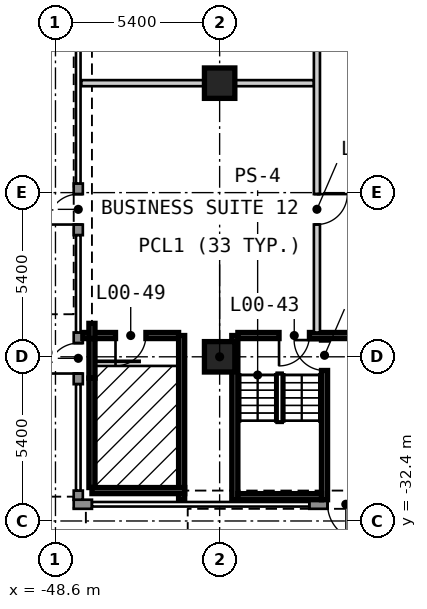
"""IFC4 building model, lengths in metres.
Left out: names, types, materials, properties, quantities, classifications, styles, units other than length and angle.
Written with IfcOpenShell. Run it as: python <this file> out.ifc"""

import sys

from ifc_helpers import new_model, si_unit, direction, frame, frame_2d, origin, origin_2d, place, context, subcontext, project, spatial, rectangle, extrude, element, fill, save


model = new_model("IFC4")
c1 = context("Model", 3, precision=1e-05, world=origin(), true_north=direction((0.0, 1.0)))
c2 = subcontext(c1, "Body", "Model", "MODEL_VIEW")
j1 = project(units=[si_unit("LENGTHUNIT", "METRE"), si_unit("PLANEANGLEUNIT", "RADIAN")], contexts=[c1])
p1 = place(None, origin())
s1 = spatial("IfcSite", under=j1, at=p1, CompositionType="ELEMENT")
p2 = place(p1, origin())
s2 = spatial("IfcBuilding", under=s1, at=p2, CompositionType="ELEMENT")
p3 = place(p2, origin())
s3 = spatial("IfcBuildingStorey", under=s2, at=p3, CompositionType="ELEMENT", Elevation=0.0)
for number, where, z_axis, x_axis in (
    (1, (-43.2, -27.0, 0.0), (0.0, 0.0, 1.0), (1.0, 0.0, 0.0)),
    (2, (-43.2, -18.0, 0.0), (0.0, 0.0, 1.0), (1.0, 0.0, 0.0)),
):
    element("IfcColumn", number, at=place(p3, frame(where, z_axis=z_axis, x_axis=x_axis)), inside=s3, PredefinedType="COLUMN", context=c2, shape_type="SweptSolid", body=[
        extrude(rectangle(XDim=1.0, YDim=1.0, at=origin_2d()), origin(), (0.0, 0.0, 1.0), 5.0),
    ])
p4 = place(p3, frame((-48.0, -31.85, 0.0), z_axis=(0.0, 0.0, 1.0), x_axis=(1.0, 0.0, 0.0)))
e3 = element("IfcWall", 3, at=p4, inside=s3, PredefinedType="SOLIDWALL", context=c2, shape_type="SweptSolid", body=[
    extrude(rectangle(XDim=0.6, YDim=0.3, at=frame_2d((0.3, 0.0))), origin(), (0.0, 0.0, 1.0), 4.55),
])
p5 = place(p3, frame((-40.25, -31.85, 0.0), z_axis=(0.0, 0.0, 1.0), x_axis=(1.0, 0.0, 0.0)))
e4 = element("IfcWall", 4, at=p5, inside=s3, PredefinedType="SOLIDWALL", context=c2, shape_type="SweptSolid", body=[
    extrude(rectangle(XDim=2.4, YDim=0.3, at=frame_2d((1.2, 0.0))), origin(), (0.0, 0.0, 1.0), 4.55),
])
p6 = place(p5, frame((1.8, 0.0, 0.0), z_axis=(0.0, 0.0, 1.0), x_axis=(-1.0, 0.0, 0.0)))
e5 = element("IfcOpeningElement", 5, at=p6, cuts=e4, PredefinedType="OPENING", context=c2, shape_type="SweptSolid", body=[
    extrude(rectangle(XDim=1.2, YDim=2.4, at=frame_2d((0.6, 1.2))), frame((0.0, 0.16, 0.0), z_axis=(0.0, -1.0, 0.0), x_axis=(1.0, 0.0, 0.0)), (0.0, 0.0, 1.0), 0.32),
])
p7 = place(p3, frame((-47.85, -21.3, 0.0), z_axis=(0.0, 0.0, 1.0), x_axis=(0.0, -1.0, 0.0)))
e6 = element("IfcWall", 6, at=p7, inside=s3, PredefinedType="SOLIDWALL", context=c2, shape_type="SweptSolid", body=[
    extrude(rectangle(XDim=1.7, YDim=0.3, at=frame_2d((0.85, 0.0))), origin(), (0.0, 0.0, 1.0), 4.55),
])
p8 = place(p7, frame((1.35, 0.0, 0.0), z_axis=(0.0, 0.0, 1.0), x_axis=(-1.0, 0.0, 0.0)))
e7 = element("IfcOpeningElement", 7, at=p8, cuts=e6, PredefinedType="OPENING", context=c2, shape_type="SweptSolid", body=[
    extrude(rectangle(XDim=1.0, YDim=2.4, at=frame_2d((0.5, 1.2))), frame((0.0, 0.16, 0.0), z_axis=(0.0, -1.0, 0.0), x_axis=(1.0, 0.0, 0.0)), (0.0, 0.0, 1.0), 0.32),
])
p9 = place(p3, frame((-47.85, -26.2, 0.0), z_axis=(0.0, 0.0, 1.0), x_axis=(0.0, -1.0, 0.0)))
e8 = element("IfcWall", 8, at=p9, inside=s3, PredefinedType="SOLIDWALL", context=c2, shape_type="SweptSolid", body=[
    extrude(rectangle(XDim=1.7, YDim=0.3, at=frame_2d((0.85, 0.0))), origin(), (0.0, 0.0, 1.0), 4.55),
])
p10 = place(p9, frame((1.35, 0.0, 0.0), z_axis=(0.0, 0.0, 1.0), x_axis=(-1.0, 0.0, 0.0)))
e9 = element("IfcOpeningElement", 9, at=p10, cuts=e8, PredefinedType="OPENING", context=c2, shape_type="SweptSolid", body=[
    extrude(rectangle(XDim=1.0, YDim=2.4, at=frame_2d((0.5, 1.2))), frame((0.0, 0.16, 0.0), z_axis=(0.0, -1.0, 0.0), x_axis=(1.0, 0.0, 0.0)), (0.0, 0.0, 1.0), 0.32),
])
p11 = place(p3, frame((-47.85, -31.4, 0.0), z_axis=(0.0, 0.0, 1.0), x_axis=(0.0, -1.0, 0.0)))
e10 = element("IfcWall", 10, at=p11, inside=s3, PredefinedType="SOLIDWALL", context=c2, shape_type="SweptSolid", body=[
    extrude(rectangle(XDim=0.3, YDim=0.3, at=frame_2d((0.15, 0.0))), origin(), (0.0, 0.0, 1.0), 4.55),
])
p12 = place(p3, frame((-47.7, -26.3, 0.0), z_axis=(0.0, 0.0, 1.0), x_axis=(1.0, 0.0, 0.0)))
e11 = element("IfcWall", 11, at=p12, inside=s3, PredefinedType="SOLIDWALL", context=c2, shape_type="SweptSolid", body=[
    extrude(rectangle(XDim=3.15, YDim=0.2, at=frame_2d((1.575, 0.0))), origin(), (0.0, 0.0, 1.0), 4.55),
])
p13 = place(p12, frame((2.075, 0.0, 0.0), z_axis=(0.0, 0.0, 1.0), x_axis=(-1.0, 0.0, 0.0)))
e12 = element("IfcOpeningElement", 12, at=p13, cuts=e11, PredefinedType="OPENING", context=c2, shape_type="SweptSolid", body=[
    extrude(rectangle(XDim=1.0, YDim=2.1, at=frame_2d((0.5, 1.05))), frame((0.0, 0.11, 0.0), z_axis=(0.0, -1.0, 0.0), x_axis=(1.0, 0.0, 0.0)), (0.0, 0.0, 1.0), 0.22),
])
p14 = place(p3, frame((-42.6, -26.3, 0.0), z_axis=(0.0, 0.0, 1.0), x_axis=(1.0, 0.0, 0.0)))
e13 = element("IfcWall", 13, at=p14, inside=s3, PredefinedType="SOLIDWALL", context=c2, shape_type="SweptSolid", body=[
    extrude(rectangle(XDim=15.15, YDim=0.2, at=frame_2d((7.575, 0.0))), origin(), (0.0, 0.0, 1.0), 4.55),
])
p15 = place(p14, frame((8.025, 0.0, 0.0), z_axis=(0.0, 0.0, 1.0), x_axis=(-1.0, 0.0, 0.0)))
e14 = element("IfcOpeningElement", 14, at=p15, cuts=e13, PredefinedType="OPENING", context=c2, shape_type="SweptSolid", body=[
    extrude(rectangle(XDim=1.0, YDim=2.1, at=frame_2d((0.5, 1.05))), frame((0.0, 0.11, 0.0), z_axis=(0.0, -1.0, 0.0), x_axis=(1.0, 0.0, 0.0)), (0.0, 0.0, 1.0), 0.22),
])
p16 = place(p14, frame((2.354, 0.0, 0.0), z_axis=(0.0, 0.0, 1.0), x_axis=(-1.0, 0.0, 0.0)))
e15 = element("IfcOpeningElement", 15, at=p16, cuts=e13, PredefinedType="OPENING", context=c2, shape_type="SweptSolid", body=[
    extrude(rectangle(XDim=1.0, YDim=2.1, at=frame_2d((0.5, 1.05))), frame((0.0, 0.11, 0.0), z_axis=(0.0, -1.0, 0.0), x_axis=(1.0, 0.0, 0.0)), (0.0, 0.0, 1.0), 0.22),
])
p17 = place(p14, frame((12.575, 0.0, 0.0), z_axis=(0.0, 0.0, 1.0), x_axis=(-1.0, 0.0, 0.0)))
e16 = element("IfcOpeningElement", 16, at=p17, cuts=e13, PredefinedType="OPENING", context=c2, shape_type="SweptSolid", body=[
    extrude(rectangle(XDim=1.0, YDim=2.1, at=frame_2d((0.5, 1.05))), frame((0.0, 0.11, 0.0), z_axis=(0.0, -1.0, 0.0), x_axis=(1.0, 0.0, 0.0)), (0.0, 0.0, 1.0), 0.22),
])
p18 = place(p3, frame((-47.75, -18.0, 0.0), z_axis=(0.0, 0.0, 1.0), x_axis=(1.0, 0.0, 0.0)))
e17 = element("IfcWall", 17, at=p18, inside=s3, PredefinedType="PARTITIONING", context=c2, shape_type="SweptSolid", body=[
    extrude(rectangle(XDim=7.65, YDim=0.2, at=frame_2d((3.825, 0.0))), origin(), (0.0, 0.0, 1.0), 4.55),
])
for number, where, z_axis, x_axis in (
    (18, (-44.45, -31.7, 0.0), (0.0, 0.0, 1.0), (0.0, 1.0, 0.0)),
    (19, (-42.7, -31.7, 0.0), (0.0, 0.0, 1.0), (0.0, 1.0, 0.0)),
):
    element("IfcWall", number, at=place(p3, frame(where, z_axis=z_axis, x_axis=x_axis)), inside=s3, PredefinedType="SOLIDWALL", context=c2, shape_type="SweptSolid", body=[
        extrude(rectangle(XDim=5.4, YDim=0.2, at=frame_2d((2.7, 0.0))), origin(), (0.0, 0.0, 1.0), 4.55),
    ])
p19 = place(p3, frame((-40.0, -26.2, 0.0), z_axis=(0.0, 0.0, 1.0), x_axis=(0.0, 1.0, 0.0)))
e20 = element("IfcWall", 20, at=p19, inside=s3, PredefinedType="PARTITIONING", context=c2, shape_type="SweptSolid", body=[
    extrude(rectangle(XDim=17.08, YDim=0.2, at=frame_2d((8.54, 0.0))), origin(), (0.0, 0.0, 1.0), 4.55),
])
p20 = place(p19, frame((3.552, 0.0, 0.0)))
e21 = element("IfcOpeningElement", 21, at=p20, cuts=e20, PredefinedType="OPENING", context=c2, shape_type="SweptSolid", body=[
    extrude(rectangle(XDim=1.0, YDim=2.1, at=frame_2d((0.5, 1.05))), frame((0.0, 0.11, 0.0), z_axis=(0.0, -1.0, 0.0), x_axis=(1.0, 0.0, 0.0)), (0.0, 0.0, 1.0), 0.22),
])
p21 = place(p19, frame((12.198, 0.0, 0.0)))
e22 = element("IfcOpeningElement", 22, at=p21, cuts=e20, PredefinedType="OPENING", context=c2, shape_type="SweptSolid", body=[
    extrude(rectangle(XDim=1.0, YDim=2.1, at=frame_2d((0.5, 1.05))), frame((0.0, 0.11, 0.0), z_axis=(0.0, -1.0, 0.0), x_axis=(1.0, 0.0, 0.0)), (0.0, 0.0, 1.0), 0.22),
])
p22 = place(p3, frame((-39.75, -31.7, 0.0), z_axis=(0.0, 0.0, 1.0), x_axis=(0.0, 1.0, 0.0)))
e23 = element("IfcWall", 23, at=p22, inside=s3, PredefinedType="SOLIDWALL", context=c2, shape_type="SweptSolid", body=[
    extrude(rectangle(XDim=5.3, YDim=0.2, at=frame_2d((2.65, 0.0))), origin(), (0.0, 0.0, 1.0), 4.55),
])
p23 = place(p22, frame((5.25, 0.0, 0.0), z_axis=(0.0, 0.0, 1.0), x_axis=(-1.0, 0.0, 0.0)))
e24 = element("IfcOpeningElement", 24, at=p23, cuts=e23, PredefinedType="OPENING", context=c2, shape_type="SweptSolid", body=[
    extrude(rectangle(XDim=1.0, YDim=2.1, at=frame_2d((0.5, 1.05))), frame((0.0, 0.11, 0.0), z_axis=(0.0, -1.0, 0.0), x_axis=(1.0, 0.0, 0.0)), (0.0, 0.0, 1.0), 0.22),
])
p24 = place(p3, frame((-47.4, -31.3, 0.0), z_axis=(0.0, 0.0, 1.0), x_axis=(0.0, 1.0, 0.0)))
e25 = element("IfcWall", 25, at=p24, inside=s3, PredefinedType="SOLIDWALL", context=c2, shape_type="SweptSolid", body=[
    extrude(rectangle(XDim=3.6, YDim=0.2, at=frame_2d((1.8, 0.0))), origin(), (0.0, 0.0, 1.0), 4.55),
])
p25 = place(p3, frame((-47.4, -26.4, 0.0), z_axis=(0.0, 0.0, 1.0), x_axis=(0.0, 1.0, 0.0)))
e26 = element("IfcWall", 26, at=p25, inside=s3, PredefinedType="SOLIDWALL", context=c2, shape_type="SweptSolid", body=[
    extrude(rectangle(XDim=0.5, YDim=0.2, at=frame_2d((0.25, 0.0))), origin(), (0.0, 0.0, 1.0), 4.55),
])
p26 = place(p3, frame((-47.4, -27.7, 2.3), z_axis=(0.0, 0.0, 1.0), x_axis=(0.0, 1.0, 0.0)))
e27 = element("IfcWall", 27, at=p26, inside=s3, PredefinedType="SOLIDWALL", context=c2, shape_type="SweptSolid", body=[
    extrude(rectangle(XDim=1.3, YDim=0.2, at=frame_2d((0.65, 0.0))), origin(), (0.0, 0.0, 1.0), 2.25),
])
p27 = place(p3, frame((-47.4, -31.4, 0.0), z_axis=(0.0, 0.0, 1.0), x_axis=(1.0, 0.0, 0.0)))
e28 = element("IfcWall", 28, at=p27, inside=s3, PredefinedType="SOLIDWALL", context=c2, shape_type="SweptSolid", body=[
    extrude(rectangle(XDim=3.05, YDim=0.2, at=frame_2d((1.525, 0.0))), origin(), (0.0, 0.0, 1.0), 4.55),
])
p28 = place(p3, frame((-42.6, -31.6, 0.0), z_axis=(0.0, 0.0, 1.0), x_axis=(1.0, 0.0, 0.0)))
e29 = element("IfcWall", 29, at=p28, inside=s3, PredefinedType="SOLIDWALL", context=c2, shape_type="SweptSolid", body=[
    extrude(rectangle(XDim=2.75, YDim=0.2, at=frame_2d((1.375, 0.0))), origin(), (0.0, 0.0, 1.0), 4.55),
])
p29 = place(p6, origin())
e30 = element("IfcDoor", 30, at=p29, inside=s3, OperationType="SINGLE_SWING_RIGHT", PredefinedType="DOOR", context=c2, shape_type="SweptSolid", body=[
    extrude(rectangle(XDim=1.2, YDim=2.4, at=frame_2d((0.6, 1.2))), frame((0.0, 0.025, 0.0), z_axis=(0.0, -1.0, 0.0), x_axis=(1.0, 0.0, 0.0)), (0.0, 0.0, 1.0), 0.05),
])
fill(e5, e30)
p30 = place(p8, origin())
e31 = element("IfcDoor", 31, at=p30, inside=s3, OperationType="SINGLE_SWING_RIGHT", PredefinedType="DOOR", context=c2, shape_type="SweptSolid", body=[
    extrude(rectangle(XDim=1.0, YDim=2.4, at=frame_2d((0.5, 1.2))), frame((0.0, 0.025, 0.0), z_axis=(0.0, -1.0, 0.0), x_axis=(1.0, 0.0, 0.0)), (0.0, 0.0, 1.0), 0.05),
])
fill(e7, e31)
p31 = place(p10, origin())
e32 = element("IfcDoor", 32, at=p31, inside=s3, OperationType="SINGLE_SWING_RIGHT", PredefinedType="DOOR", context=c2, shape_type="SweptSolid", body=[
    extrude(rectangle(XDim=1.0, YDim=2.4, at=frame_2d((0.5, 1.2))), frame((0.0, 0.025, 0.0), z_axis=(0.0, -1.0, 0.0), x_axis=(1.0, 0.0, 0.0)), (0.0, 0.0, 1.0), 0.05),
])
fill(e9, e32)
p32 = place(p20, origin())
e33 = element("IfcDoor", 33, at=p32, inside=s3, OperationType="SINGLE_SWING_RIGHT", PredefinedType="DOOR", context=c2, shape_type="SweptSolid", body=[
    extrude(rectangle(XDim=1.0, YDim=2.1, at=frame_2d((0.5, 1.05))), frame((0.0, 0.025, 0.0), z_axis=(0.0, -1.0, 0.0), x_axis=(1.0, 0.0, 0.0)), (0.0, 0.0, 1.0), 0.05),
])
fill(e21, e33)
p33 = place(p16, origin())
e34 = element("IfcDoor", 34, at=p33, inside=s3, OperationType="SINGLE_SWING_RIGHT", PredefinedType="DOOR", context=c2, shape_type="SweptSolid", body=[
    extrude(rectangle(XDim=1.0, YDim=2.1, at=frame_2d((0.5, 1.05))), frame((0.0, 0.025, 0.0), z_axis=(0.0, -1.0, 0.0), x_axis=(1.0, 0.0, 0.0)), (0.0, 0.0, 1.0), 0.05),
])
fill(e15, e34)
p34 = place(p13, origin())
e35 = element("IfcDoor", 35, at=p34, inside=s3, OperationType="SINGLE_SWING_RIGHT", PredefinedType="DOOR", context=c2, shape_type="SweptSolid", body=[
    extrude(rectangle(XDim=1.0, YDim=2.1, at=frame_2d((0.5, 1.05))), frame((0.0, 0.025, 0.0), z_axis=(0.0, -1.0, 0.0), x_axis=(1.0, 0.0, 0.0)), (0.0, 0.0, 1.0), 0.05),
])
fill(e12, e35)
p35 = place(p23, origin())
e36 = element("IfcDoor", 36, at=p35, inside=s3, OperationType="SINGLE_SWING_LEFT", PredefinedType="DOOR", context=c2, shape_type="SweptSolid", body=[
    extrude(rectangle(XDim=1.0, YDim=2.1, at=frame_2d((0.5, 1.05))), frame((0.0, 0.025, 0.0), z_axis=(0.0, -1.0, 0.0), x_axis=(1.0, 0.0, 0.0)), (0.0, 0.0, 1.0), 0.05),
])
fill(e24, e36)
save(model, sys.argv[1])
